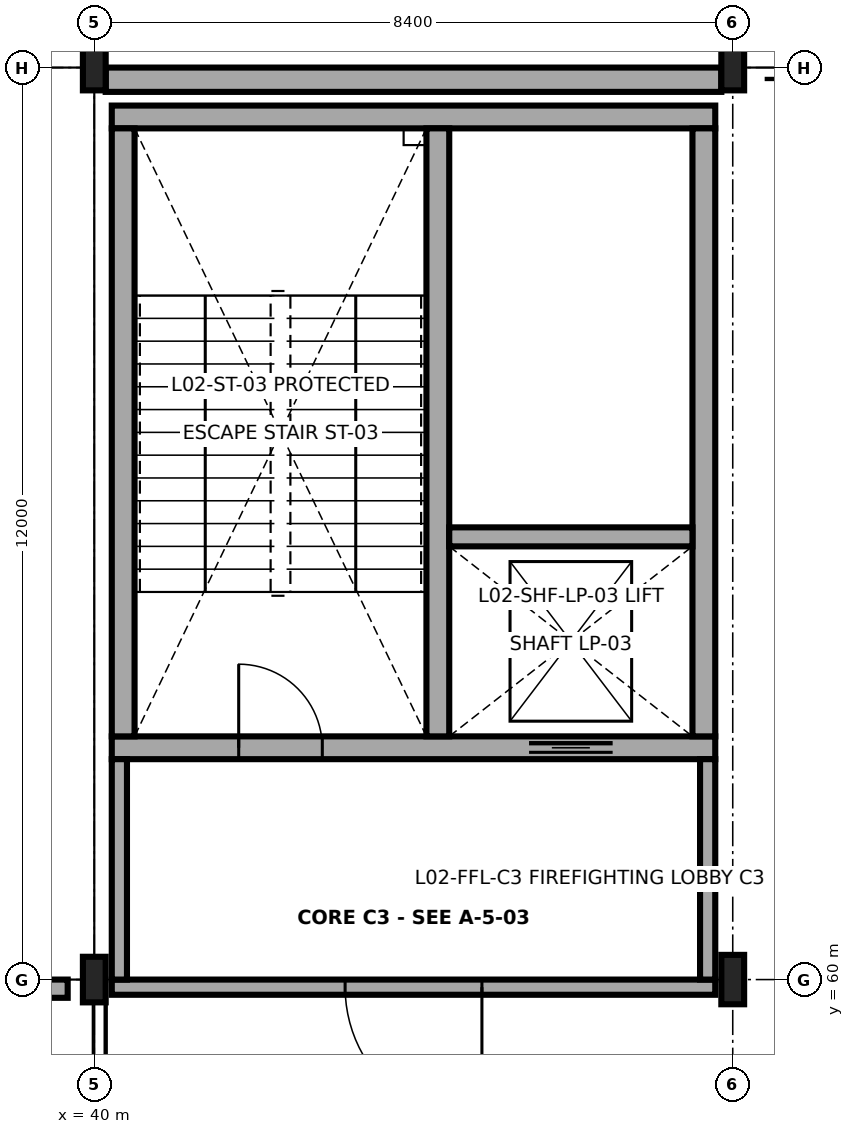
"""IFC4 building model, lengths in metres.
Left out: names, types, materials, properties, quantities, classifications, styles, units other than length and angle.
Written with IfcOpenShell. Run it as: python <this file> out.ifc"""

import sys

from ifc_helpers import new_model, si_unit, direction, frame, frame_2d, origin, origin_2d, place, context, subcontext, project, spatial, rectangle, i_section, extrude, element, fill, save


model = new_model("IFC4")
c1 = context("Model", 3, precision=1e-05, world=origin(), true_north=direction((0.0, 1.0)))
c2 = subcontext(c1, "Body", "Model", "MODEL_VIEW")
j1 = project(units=[si_unit("LENGTHUNIT", "METRE"), si_unit("PLANEANGLEUNIT", "RADIAN")], contexts=[c1])
p1 = place(None, origin())
s1 = spatial("IfcSite", under=j1, at=p1, CompositionType="ELEMENT")
p2 = place(p1, origin())
s2 = spatial("IfcBuilding", under=s1, at=p2, CompositionType="ELEMENT")
p3 = place(p2, frame((0.0, 0.0, 12.9)))
s3 = spatial("IfcBuildingStorey", under=s2, at=p3, CompositionType="ELEMENT", Elevation=12.9)
for number, where, z_axis, x_axis in (
    (1, (40.0, 60.0, 0.0), (0.0, 0.0, 1.0), (1.0, 0.0, 0.0)),
    (2, (40.0, 72.0, 0.0), (0.0, 0.0, 1.0), (1.0, 0.0, 0.0)),
):
    element("IfcColumn", number, at=place(p3, frame(where, z_axis=z_axis, x_axis=x_axis)), inside=s3, PredefinedType="COLUMN", context=c2, shape_type="SweptSolid", body=[
        extrude(i_section(OverallWidth=0.3, OverallDepth=0.6, WebThickness=0.015, FlangeThickness=0.03, FilletRadius=0.027, at=origin_2d()), origin(), (0.0, 0.0, 1.0), 4.5),
    ])
p4 = place(p3, frame((48.4, 60.0, 0.0), z_axis=(0.0, 0.0, 1.0), x_axis=(1.0, 0.0, 0.0)))
e3 = element("IfcColumn", 3, at=p4, inside=s3, PredefinedType="COLUMN", context=c2, shape_type="SweptSolid", body=[
    extrude(i_section(OverallWidth=0.3, OverallDepth=0.65, WebThickness=0.016, FlangeThickness=0.031, FilletRadius=0.027, at=origin_2d()), origin(), (0.0, 0.0, 1.0), 4.5),
])
p5 = place(p3, frame((48.4, 72.0, 0.0), z_axis=(0.0, 0.0, 1.0), x_axis=(1.0, 0.0, 0.0)))
e4 = element("IfcColumn", 4, at=p5, inside=s3, PredefinedType="COLUMN", context=c2, shape_type="SweptSolid", body=[
    extrude(i_section(OverallWidth=0.3, OverallDepth=0.6, WebThickness=0.015, FlangeThickness=0.03, FilletRadius=0.027, at=origin_2d()), origin(), (0.0, 0.0, 1.0), 4.5),
])
p6 = place(p3, frame((23.32, 59.88, 0.0), z_axis=(0.0, 0.0, 1.0), x_axis=(1.0, 0.0, 0.0)))
e5 = element("IfcWall", 5, at=p6, inside=s3, PredefinedType="PARAPET", context=c2, shape_type="SweptSolid", body=[
    extrude(rectangle(XDim=16.33, YDim=0.24, at=frame_2d((8.165, 0.0))), origin(), (0.0, 0.0, 1.0), 0.95),
])
p7 = place(p3, frame((48.25, 71.84, 0.0), z_axis=(0.0, 0.0, 1.0), x_axis=(-1.0, 0.0, 0.0)))
e6 = element("IfcWall", 6, at=p7, inside=s3, PredefinedType="SOLIDWALL", context=c2, shape_type="SweptSolid", body=[
    extrude(rectangle(XDim=8.1, YDim=0.32, at=frame_2d((4.05, 0.0))), origin(), (0.0, 0.0, 1.0), 3.88),
])
p8 = place(p3, frame((40.23, 63.05, 0.0), z_axis=(0.0, 0.0, 1.0), x_axis=(1.0, 0.0, 0.0)))
e7 = element("IfcWall", 7, at=p8, inside=s3, PredefinedType="SHEAR", context=c2, shape_type="SweptSolid", body=[
    extrude(rectangle(XDim=7.94, YDim=0.3, at=frame_2d((3.97, 0.0))), origin(), (0.0, 0.0, 1.0), 4.25),
])
p9 = place(p8, frame((1.67, 0.0, 0.0)))
e8 = element("IfcOpeningElement", 8, at=p9, cuts=e7, PredefinedType="OPENING", context=c2, shape_type="SweptSolid", body=[
    extrude(rectangle(XDim=1.1, YDim=2.2, at=frame_2d((0.55, 1.1))), frame((0.0, 0.16, 0.0), z_axis=(0.0, -1.0, 0.0), x_axis=(1.0, 0.0, 0.0)), (0.0, 0.0, 1.0), 0.32),
])
p10 = place(p8, frame((5.49, 0.0, 0.0)))
e9 = element("IfcOpeningElement", 9, at=p10, cuts=e7, PredefinedType="OPENING", context=c2, shape_type="SweptSolid", body=[
    extrude(rectangle(XDim=1.1, YDim=2.1, at=frame_2d((0.55, 1.05))), frame((0.0, 0.16, 0.0), z_axis=(0.0, -1.0, 0.0), x_axis=(1.0, 0.0, 0.0)), (0.0, 0.0, 1.0), 0.32),
])
p11 = place(p3, frame((48.17, 71.35, 0.0), z_axis=(0.0, 0.0, 1.0), x_axis=(-1.0, 0.0, 0.0)))
e10 = element("IfcWall", 10, at=p11, inside=s3, PredefinedType="SHEAR", context=c2, shape_type="SweptSolid", body=[
    extrude(rectangle(XDim=7.94, YDim=0.3, at=frame_2d((3.97, 0.0))), origin(), (0.0, 0.0, 1.0), 4.25),
])
for number, where, z_axis, x_axis in (
    (11, (40.38, 71.2, 0.0), (0.0, 0.0, 1.0), (0.0, -1.0, 0.0)),
    (12, (48.02, 63.2, 0.0), (0.0, 0.0, 1.0), (0.0, 1.0, 0.0)),
    (13, (44.52, 63.2, 0.0), (0.0, 0.0, 1.0), (0.0, 1.0, 0.0)),
):
    element("IfcWall", number, at=place(p3, frame(where, z_axis=z_axis, x_axis=x_axis)), inside=s3, PredefinedType="SHEAR", context=c2, shape_type="SweptSolid", body=[
        extrude(rectangle(XDim=8.0, YDim=0.3, at=frame_2d((4.0, 0.0))), origin(), (0.0, 0.0, 1.0), 4.25),
    ])
p12 = place(p3, frame((44.67, 65.825, 0.0), z_axis=(0.0, 0.0, 1.0), x_axis=(1.0, 0.0, 0.0)))
e14 = element("IfcWall", 14, at=p12, inside=s3, PredefinedType="SHEAR", context=c2, shape_type="SweptSolid", body=[
    extrude(rectangle(XDim=3.2, YDim=0.25, at=frame_2d((1.6, 0.0))), origin(), (0.0, 0.0, 1.0), 4.25),
])
p13 = place(p3, frame((48.17, 59.9, 0.0), z_axis=(0.0, 0.0, 1.0), x_axis=(-1.0, 0.0, 0.0)))
e15 = element("IfcWall", 15, at=p13, inside=s3, PredefinedType="SOLIDWALL", context=c2, shape_type="SweptSolid", body=[
    extrude(rectangle(XDim=7.94, YDim=0.2, at=frame_2d((3.97, 0.0))), origin(), (0.0, 0.0, 1.0), 3.532),
])
p14 = place(p13, frame((3.07, 0.0, 0.0)))
e16 = element("IfcOpeningElement", 16, at=p14, cuts=e15, PredefinedType="OPENING", context=c2, shape_type="SweptSolid", body=[
    extrude(rectangle(XDim=1.8, YDim=2.2, at=frame_2d((0.9, 1.1))), frame((0.0, 0.11, 0.0), z_axis=(0.0, -1.0, 0.0), x_axis=(1.0, 0.0, 0.0)), (0.0, 0.0, 1.0), 0.22),
])
for number, where, z_axis, x_axis in (
    (17, (40.33, 60.0, 0.0), (0.0, 0.0, 1.0), (0.0, 1.0, 0.0)),
    (18, (48.07, 62.9, 0.0), (0.0, 0.0, 1.0), (0.0, -1.0, 0.0)),
):
    element("IfcWall", number, at=place(p3, frame(where, z_axis=z_axis, x_axis=x_axis)), inside=s3, PredefinedType="SOLIDWALL", context=c2, shape_type="SweptSolid", body=[
        extrude(rectangle(XDim=2.9, YDim=0.2, at=frame_2d((1.45, 0.0))), origin(), (0.0, 0.0, 1.0), 3.922),
    ])
p15 = place(p9, origin())
e19 = element("IfcDoor", 19, at=p15, inside=s3, OperationType="SINGLE_SWING_LEFT", PredefinedType="DOOR", context=c2, shape_type="SweptSolid", body=[
    extrude(rectangle(XDim=1.1, YDim=2.2, at=frame_2d((0.55, 1.1))), frame((0.0, 0.025, 0.0), z_axis=(0.0, -1.0, 0.0), x_axis=(1.0, 0.0, 0.0)), (0.0, 0.0, 1.0), 0.05),
])
fill(e8, e19)
p16 = place(p10, origin())
e20 = element("IfcDoor", 20, at=p16, inside=s3, OperationType="SLIDING_TO_LEFT", PredefinedType="DOOR", context=c2, shape_type="SweptSolid", body=[
    extrude(rectangle(XDim=1.1, YDim=2.1, at=frame_2d((0.55, 1.05))), frame((0.0, 0.025, 0.0), z_axis=(0.0, -1.0, 0.0), x_axis=(1.0, 0.0, 0.0)), (0.0, 0.0, 1.0), 0.05),
])
fill(e9, e20)
p17 = place(p14, origin())
e21 = element("IfcDoor", 21, at=p17, inside=s3, OperationType="DOUBLE_DOOR_SINGLE_SWING", PredefinedType="DOOR", context=c2, shape_type="SweptSolid", body=[
    extrude(rectangle(XDim=1.8, YDim=2.2, at=frame_2d((0.9, 1.1))), frame((0.0, 0.025, 0.0), z_axis=(0.0, -1.0, 0.0), x_axis=(1.0, 0.0, 0.0)), (0.0, 0.0, 1.0), 0.05),
])
fill(e16, e21)
save(model, sys.argv[1])
